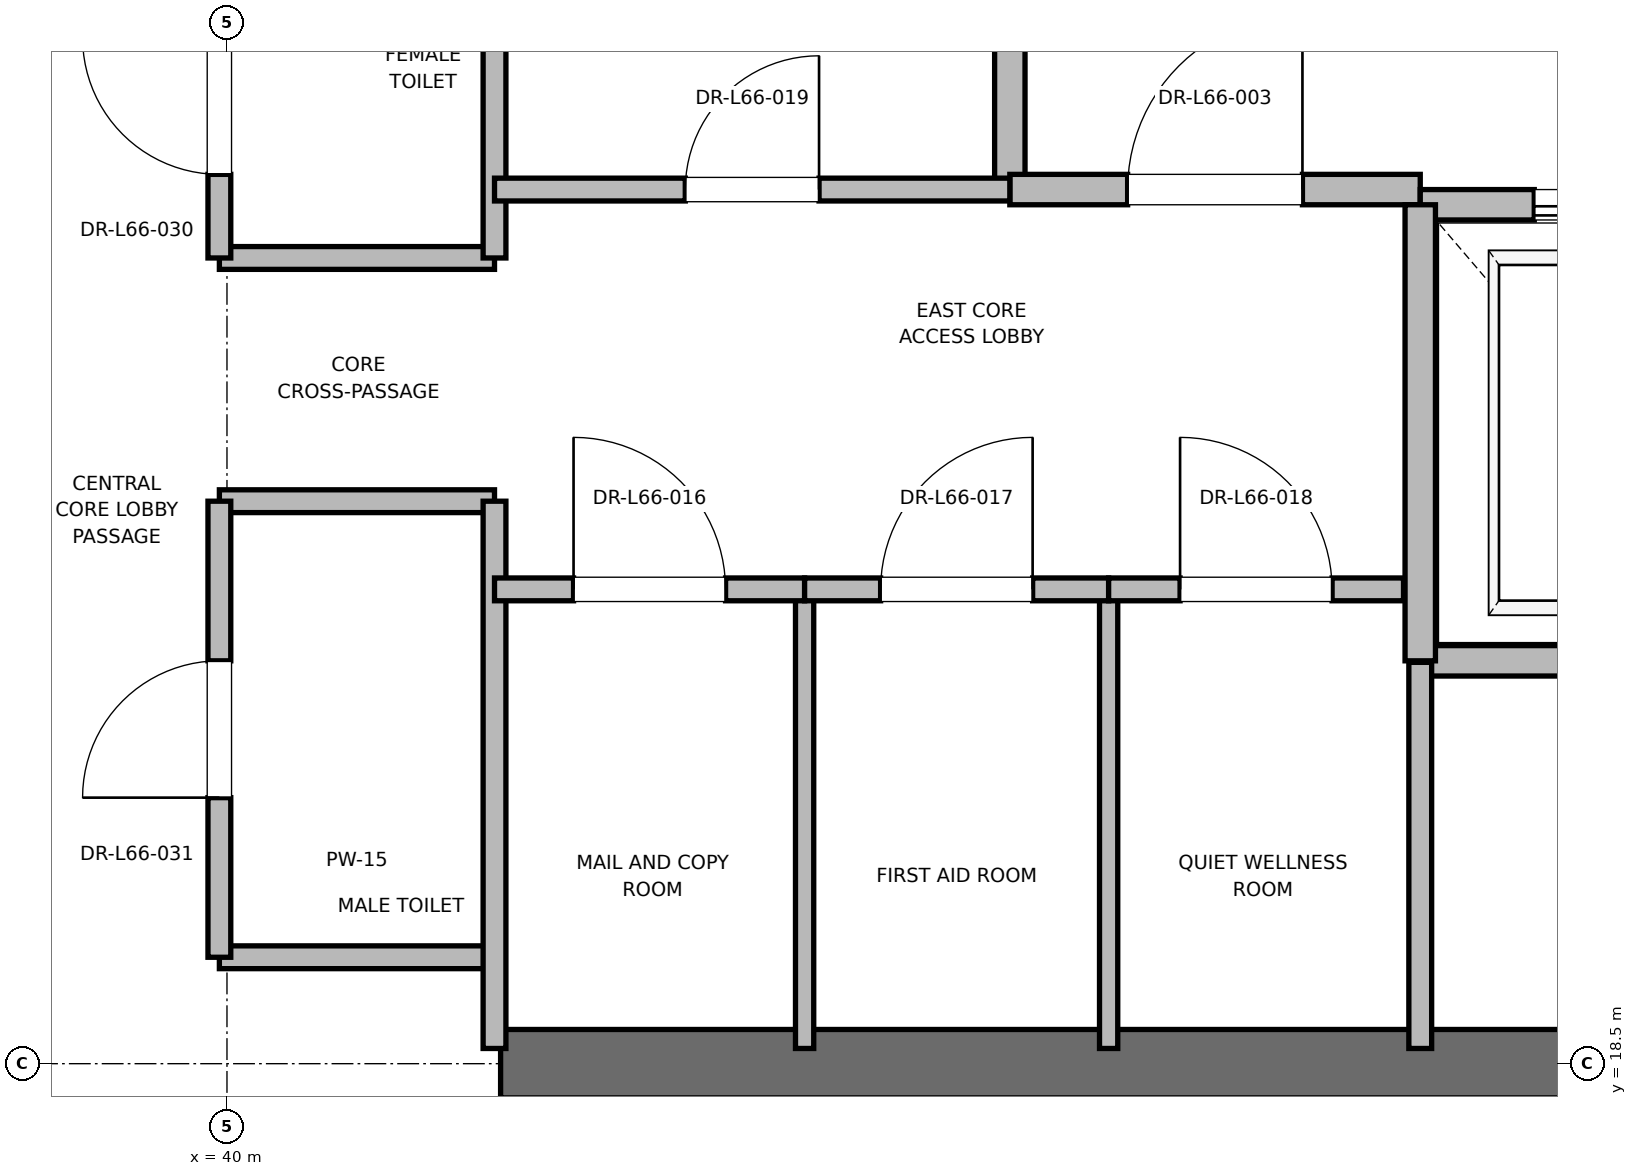
"""IFC4 building model, lengths in metres.
Left out: names, types, materials, properties, quantities, classifications, styles, units other than length and angle.
Written with IfcOpenShell. Run it as: python <this file> out.ifc"""

import sys

from ifc_helpers import new_model, si_unit, direction, frame, frame_2d, origin, place, context, subcontext, project, spatial, rectangle, extrude, element, fill, save


model = new_model("IFC4")
c1 = context("Model", 3, precision=1e-05, world=origin(), true_north=direction((0.0, 1.0)))
c2 = subcontext(c1, "Body", "Model", "MODEL_VIEW")
j1 = project(units=[si_unit("LENGTHUNIT", "METRE"), si_unit("PLANEANGLEUNIT", "RADIAN")], contexts=[c1])
p1 = place(None, origin())
s1 = spatial("IfcSite", under=j1, at=p1, CompositionType="ELEMENT")
p2 = place(p1, origin())
s2 = spatial("IfcBuilding", under=s1, at=p2, CompositionType="ELEMENT")
p3 = place(p2, frame((0.0, 0.0, 283.2)))
s3 = spatial("IfcBuildingStorey", under=s2, at=p3, CompositionType="ELEMENT", Elevation=283.2)
p4 = place(p3, frame((41.8, 18.5, 0.0), z_axis=(0.0, 0.0, 1.0), x_axis=(1.0, 0.0, 0.0)))
e1 = element("IfcWall", 1, at=p4, inside=s3, PredefinedType="SHEAR", context=c2, shape_type="SweptSolid", body=[
    extrude(rectangle(XDim=9.2, YDim=0.45, at=frame_2d((4.6, 0.0))), origin(), (0.0, 0.0, 1.0), 3.785),
])
p5 = place(p3, frame((45.15, 24.25, 0.0), z_axis=(0.0, 0.0, 1.0), x_axis=(0.0, 1.0, 0.0)))
e2 = element("IfcWall", 2, at=p5, inside=s3, PredefinedType="PARTITIONING", context=c2, shape_type="SweptSolid", body=[
    extrude(rectangle(XDim=3.37, YDim=0.2, at=frame_2d((1.685, 0.0))), origin(), (0.0, 0.0, 1.0), 3.785),
])
p6 = place(p3, frame((45.15, 24.25, 0.0), z_axis=(0.0, 0.0, 1.0), x_axis=(1.0, 0.0, 0.0)))
e3 = element("IfcWall", 3, at=p6, inside=s3, PredefinedType="PARTITIONING", context=c2, shape_type="SweptSolid", body=[
    extrude(rectangle(XDim=2.7, YDim=0.2, at=frame_2d((1.35, 0.0))), origin(), (0.0, 0.0, 1.0), 3.785),
])
p7 = place(p6, frame((0.775, 0.0, 0.0)))
e4 = element("IfcOpeningElement", 4, at=p7, cuts=e3, PredefinedType="OPENING", context=c2, shape_type="SweptSolid", body=[
    extrude(rectangle(XDim=1.15, YDim=2.2, at=frame_2d((0.575, 1.1))), frame((0.0, 0.1, 0.0), z_axis=(0.0, -1.0, 0.0), x_axis=(1.0, 0.0, 0.0)), (0.0, 0.0, 1.0), 0.2),
])
p8 = place(p3, frame((47.85, 21.15, 0.0), z_axis=(0.0, 0.0, 1.0), x_axis=(1.0, 0.0, 0.0)))
e5 = element("IfcWall", 5, at=p8, inside=s3, PredefinedType="SOLIDWALL", context=c2, shape_type="SweptSolid", body=[
    extrude(rectangle(XDim=2.6, YDim=0.2, at=frame_2d((1.3, 0.0))), origin(), (0.0, 0.0, 1.0), 3.785),
])
p9 = place(p3, frame((50.45, 24.15, 0.0), z_axis=(0.0, 0.0, 1.0), x_axis=(-1.0, 0.0, 0.0)))
e6 = element("IfcWall", 6, at=p9, inside=s3, PredefinedType="SOLIDWALL", context=c2, shape_type="SweptSolid", body=[
    extrude(rectangle(XDim=2.6, YDim=0.2, at=frame_2d((1.3, 0.0))), origin(), (0.0, 0.0, 1.0), 2.865),
])
p10 = place(p9, frame((0.75, 0.0, 0.0)))
e7 = element("IfcOpeningElement", 7, at=p10, cuts=e6, PredefinedType="OPENING", context=c2, shape_type="SweptSolid", body=[
    extrude(rectangle(XDim=1.1, YDim=2.2, at=frame_2d((0.55, 1.1))), frame((0.0, 0.1, 0.0), z_axis=(0.0, -1.0, 0.0), x_axis=(1.0, 0.0, 0.0)), (0.0, 0.0, 1.0), 0.2),
])
p11 = place(p3, frame((47.85, 24.15, 0.0), z_axis=(0.0, 0.0, 1.0), x_axis=(0.0, -1.0, 0.0)))
e8 = element("IfcWall", 8, at=p11, inside=s3, PredefinedType="SOLIDWALL", context=c2, shape_type="SweptSolid", body=[
    extrude(rectangle(XDim=3.0, YDim=0.2, at=frame_2d((1.5, 0.0))), origin(), (0.0, 0.0, 1.0), 3.785),
])
for number, where, z_axis, x_axis in (
    (9, (39.95, 19.2, 0.0), (0.0, 0.0, 1.0), (1.0, 0.0, 0.0)),
    (10, (39.95, 22.2, 0.0), (0.0, 0.0, 1.0), (1.0, 0.0, 0.0)),
    (11, (39.95, 23.8, 0.0), (0.0, 0.0, 1.0), (1.0, 0.0, 0.0)),
):
    element("IfcWall", number, at=place(p3, frame(where, z_axis=z_axis, x_axis=x_axis)), inside=s3, PredefinedType="PARTITIONING", context=c2, shape_type="SweptSolid", body=[
        extrude(rectangle(XDim=1.81, YDim=0.15, at=frame_2d((0.905, 0.0))), origin(), (0.0, 0.0, 1.0), 2.85),
    ])
p12 = place(p3, frame((41.76, 18.6, 0.0), z_axis=(0.0, 0.0, 1.0), x_axis=(0.0, 1.0, 0.0)))
e12 = element("IfcWall", 12, at=p12, inside=s3, PredefinedType="PARTITIONING", context=c2, shape_type="SweptSolid", body=[
    extrude(rectangle(XDim=3.6, YDim=0.15, at=frame_2d((1.8, 0.0))), origin(), (0.0, 0.0, 1.0), 2.85),
])
p13 = place(p3, frame((41.76, 23.8, 0.0), z_axis=(0.0, 0.0, 1.0), x_axis=(0.0, 1.0, 0.0)))
e13 = element("IfcWall", 13, at=p13, inside=s3, PredefinedType="PARTITIONING", context=c2, shape_type="SweptSolid", body=[
    extrude(rectangle(XDim=4.0, YDim=0.15, at=frame_2d((2.0, 0.0))), origin(), (0.0, 0.0, 1.0), 2.85),
])
p14 = place(p3, frame((39.95, 19.2, 0.0), z_axis=(0.0, 0.0, 1.0), x_axis=(0.0, 1.0, 0.0)))
e14 = element("IfcWall", 14, at=p14, inside=s3, PredefinedType="PARTITIONING", context=c2, shape_type="SweptSolid", body=[
    extrude(rectangle(XDim=3.0, YDim=0.15, at=frame_2d((1.5, 0.0))), origin(), (0.0, 0.0, 1.0), 2.85),
])
p15 = place(p14, frame((1.05, 0.0, 0.0)))
e15 = element("IfcOpeningElement", 15, at=p15, cuts=e14, PredefinedType="OPENING", context=c2, shape_type="SweptSolid", body=[
    extrude(rectangle(XDim=0.9, YDim=2.1, at=frame_2d((0.45, 1.05))), frame((0.0, 0.075, 0.0), z_axis=(0.0, -1.0, 0.0), x_axis=(1.0, 0.0, 0.0)), (0.0, 0.0, 1.0), 0.15),
])
p16 = place(p3, frame((39.95, 23.8, 0.0), z_axis=(0.0, 0.0, 1.0), x_axis=(0.0, 1.0, 0.0)))
e16 = element("IfcWall", 16, at=p16, inside=s3, PredefinedType="PARTITIONING", context=c2, shape_type="SweptSolid", body=[
    extrude(rectangle(XDim=2.0, YDim=0.15, at=frame_2d((1.0, 0.0))), origin(), (0.0, 0.0, 1.0), 2.85),
])
p17 = place(p16, frame((0.55, 0.0, 0.0)))
e17 = element("IfcOpeningElement", 17, at=p17, cuts=e16, PredefinedType="OPENING", context=c2, shape_type="SweptSolid", body=[
    extrude(rectangle(XDim=0.9, YDim=2.1, at=frame_2d((0.45, 1.05))), frame((0.0, 0.075, 0.0), z_axis=(0.0, -1.0, 0.0), x_axis=(1.0, 0.0, 0.0)), (0.0, 0.0, 1.0), 0.15),
])
p18 = place(p3, frame((47.85, 18.6, 0.0), z_axis=(0.0, 0.0, 1.0), x_axis=(0.0, 1.0, 0.0)))
e18 = element("IfcWall", 18, at=p18, inside=s3, PredefinedType="PARTITIONING", context=c2, shape_type="SweptSolid", body=[
    extrude(rectangle(XDim=2.54, YDim=0.15, at=frame_2d((1.27, 0.0))), origin(), (0.0, 0.0, 1.0), 2.85),
])
for number, where, z_axis, x_axis in (
    (19, (43.8, 18.6, 0.0), (0.0, 0.0, 1.0), (0.0, 1.0, 0.0)),
    (20, (45.8, 18.6, 0.0), (0.0, 0.0, 1.0), (0.0, 1.0, 0.0)),
):
    element("IfcWall", number, at=place(p3, frame(where, z_axis=z_axis, x_axis=x_axis)), inside=s3, PredefinedType="PARTITIONING", context=c2, shape_type="SweptSolid", body=[
        extrude(rectangle(XDim=3.02, YDim=0.12, at=frame_2d((1.51, 0.0))), origin(), (0.0, 0.0, 1.0), 2.85),
    ])
p19 = place(p3, frame((41.76, 21.62, 0.0), z_axis=(0.0, 0.0, 1.0), x_axis=(1.0, 0.0, 0.0)))
e21 = element("IfcWall", 21, at=p19, inside=s3, PredefinedType="PARTITIONING", context=c2, shape_type="SweptSolid", body=[
    extrude(rectangle(XDim=2.04, YDim=0.15, at=frame_2d((1.02, 0.0))), origin(), (0.0, 0.0, 1.0), 2.85),
])
p20 = place(p19, frame((0.52, 0.0, 0.0)))
e22 = element("IfcOpeningElement", 22, at=p20, cuts=e21, PredefinedType="OPENING", context=c2, shape_type="SweptSolid", body=[
    extrude(rectangle(XDim=1.0, YDim=2.15, at=frame_2d((0.5, 1.075))), frame((0.0, 0.075, 0.0), z_axis=(0.0, -1.0, 0.0), x_axis=(1.0, 0.0, 0.0)), (0.0, 0.0, 1.0), 0.15),
])
p21 = place(p3, frame((43.8, 21.62, 0.0), z_axis=(0.0, 0.0, 1.0), x_axis=(1.0, 0.0, 0.0)))
e23 = element("IfcWall", 23, at=p21, inside=s3, PredefinedType="PARTITIONING", context=c2, shape_type="SweptSolid", body=[
    extrude(rectangle(XDim=2.0, YDim=0.15, at=frame_2d((1.0, 0.0))), origin(), (0.0, 0.0, 1.0), 2.85),
])
p22 = place(p21, frame((0.5, 0.0, 0.0)))
e24 = element("IfcOpeningElement", 24, at=p22, cuts=e23, PredefinedType="OPENING", context=c2, shape_type="SweptSolid", body=[
    extrude(rectangle(XDim=1.0, YDim=2.15, at=frame_2d((0.5, 1.075))), frame((0.0, 0.075, 0.0), z_axis=(0.0, -1.0, 0.0), x_axis=(1.0, 0.0, 0.0)), (0.0, 0.0, 1.0), 0.15),
])
p23 = place(p3, frame((45.8, 21.62, 0.0), z_axis=(0.0, 0.0, 1.0), x_axis=(1.0, 0.0, 0.0)))
e25 = element("IfcWall", 25, at=p23, inside=s3, PredefinedType="PARTITIONING", context=c2, shape_type="SweptSolid", body=[
    extrude(rectangle(XDim=1.94, YDim=0.15, at=frame_2d((0.97, 0.0))), origin(), (0.0, 0.0, 1.0), 2.85),
])
p24 = place(p23, frame((0.47, 0.0, 0.0)))
e26 = element("IfcOpeningElement", 26, at=p24, cuts=e25, PredefinedType="OPENING", context=c2, shape_type="SweptSolid", body=[
    extrude(rectangle(XDim=1.0, YDim=2.15, at=frame_2d((0.5, 1.075))), frame((0.0, 0.075, 0.0), z_axis=(0.0, -1.0, 0.0), x_axis=(1.0, 0.0, 0.0)), (0.0, 0.0, 1.0), 0.15),
])
p25 = place(p3, frame((41.76, 24.25, 0.0), z_axis=(0.0, 0.0, 1.0), x_axis=(1.0, 0.0, 0.0)))
e27 = element("IfcWall", 27, at=p25, inside=s3, PredefinedType="PARTITIONING", context=c2, shape_type="SweptSolid", body=[
    extrude(rectangle(XDim=3.39, YDim=0.15, at=frame_2d((1.695, 0.0))), origin(), (0.0, 0.0, 1.0), 2.85),
])
p26 = place(p25, frame((1.255, 0.0, 0.0)))
e28 = element("IfcOpeningElement", 28, at=p26, cuts=e27, PredefinedType="OPENING", context=c2, shape_type="SweptSolid", body=[
    extrude(rectangle(XDim=0.88, YDim=2.1, at=frame_2d((0.44, 1.05))), frame((0.0, 0.075, 0.0), z_axis=(0.0, -1.0, 0.0), x_axis=(1.0, 0.0, 0.0)), (0.0, 0.0, 1.0), 0.15),
])
p27 = place(p7, origin())
e29 = element("IfcDoor", 29, at=p27, inside=s3, OperationType="SINGLE_SWING_RIGHT", PredefinedType="DOOR", context=c2, shape_type="SweptSolid", body=[
    extrude(rectangle(XDim=1.15, YDim=2.2, at=frame_2d((0.575, 1.1))), frame((0.0, 0.025, 0.0), z_axis=(0.0, -1.0, 0.0), x_axis=(1.0, 0.0, 0.0)), (0.0, 0.0, 1.0), 0.05),
])
fill(e4, e29)
p28 = place(p10, origin())
e30 = element("IfcDoor", 30, at=p28, inside=s3, OperationType="SLIDING_TO_RIGHT", PredefinedType="DOOR", context=c2, shape_type="SweptSolid", body=[
    extrude(rectangle(XDim=1.1, YDim=2.2, at=frame_2d((0.55, 1.1))), frame((0.0, 0.025, 0.0), z_axis=(0.0, -1.0, 0.0), x_axis=(1.0, 0.0, 0.0)), (0.0, 0.0, 1.0), 0.05),
])
fill(e7, e30)
p29 = place(p15, origin())
e31 = element("IfcDoor", 31, at=p29, inside=s3, OperationType="SINGLE_SWING_LEFT", PredefinedType="DOOR", context=c2, shape_type="SweptSolid", body=[
    extrude(rectangle(XDim=0.9, YDim=2.1, at=frame_2d((0.45, 1.05))), frame((0.0, 0.025, 0.0), z_axis=(0.0, -1.0, 0.0), x_axis=(1.0, 0.0, 0.0)), (0.0, 0.0, 1.0), 0.05),
])
fill(e15, e31)
p30 = place(p17, origin())
e32 = element("IfcDoor", 32, at=p30, inside=s3, OperationType="SINGLE_SWING_RIGHT", PredefinedType="DOOR", context=c2, shape_type="SweptSolid", body=[
    extrude(rectangle(XDim=0.9, YDim=2.1, at=frame_2d((0.45, 1.05))), frame((0.0, 0.025, 0.0), z_axis=(0.0, -1.0, 0.0), x_axis=(1.0, 0.0, 0.0)), (0.0, 0.0, 1.0), 0.05),
])
fill(e17, e32)
p31 = place(p20, origin())
e33 = element("IfcDoor", 33, at=p31, inside=s3, OperationType="SINGLE_SWING_LEFT", PredefinedType="DOOR", context=c2, shape_type="SweptSolid", body=[
    extrude(rectangle(XDim=1.0, YDim=2.15, at=frame_2d((0.5, 1.075))), frame((0.0, 0.025, 0.0), z_axis=(0.0, -1.0, 0.0), x_axis=(1.0, 0.0, 0.0)), (0.0, 0.0, 1.0), 0.05),
])
fill(e22, e33)
p32 = place(p22, origin())
e34 = element("IfcDoor", 34, at=p32, inside=s3, OperationType="SINGLE_SWING_RIGHT", PredefinedType="DOOR", context=c2, shape_type="SweptSolid", body=[
    extrude(rectangle(XDim=1.0, YDim=2.15, at=frame_2d((0.5, 1.075))), frame((0.0, 0.025, 0.0), z_axis=(0.0, -1.0, 0.0), x_axis=(1.0, 0.0, 0.0)), (0.0, 0.0, 1.0), 0.05),
])
fill(e24, e34)
p33 = place(p24, origin())
e35 = element("IfcDoor", 35, at=p33, inside=s3, OperationType="SINGLE_SWING_LEFT", PredefinedType="DOOR", context=c2, shape_type="SweptSolid", body=[
    extrude(rectangle(XDim=1.0, YDim=2.15, at=frame_2d((0.5, 1.075))), frame((0.0, 0.025, 0.0), z_axis=(0.0, -1.0, 0.0), x_axis=(1.0, 0.0, 0.0)), (0.0, 0.0, 1.0), 0.05),
])
fill(e26, e35)
p34 = place(p26, origin())
e36 = element("IfcDoor", 36, at=p34, inside=s3, OperationType="SINGLE_SWING_RIGHT", PredefinedType="DOOR", context=c2, shape_type="SweptSolid", body=[
    extrude(rectangle(XDim=0.88, YDim=2.1, at=frame_2d((0.44, 1.05))), frame((0.0, 0.025, 0.0), z_axis=(0.0, -1.0, 0.0), x_axis=(1.0, 0.0, 0.0)), (0.0, 0.0, 1.0), 0.05),
])
fill(e28, e36)
save(model, sys.argv[1])
